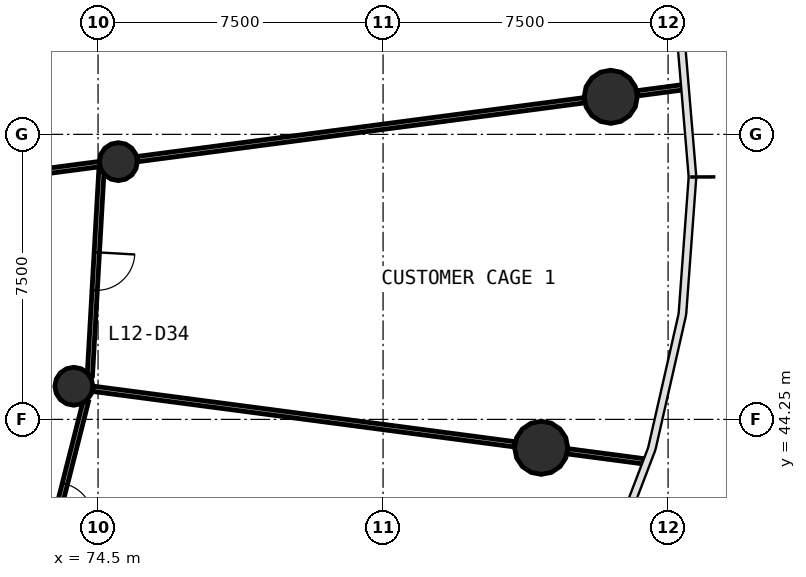
"""IFC4 building model, lengths in metres.
Left out: names, types, materials, properties, quantities, classifications, styles, units other than length and angle.
Written with IfcOpenShell. Run it as: python <this file> out.ifc"""

import sys

from ifc_helpers import new_model, si_unit, direction, frame, frame_2d, origin, origin_2d, place, context, subcontext, project, spatial, rectangle, circle, extrude, source, transform, mapped, element, fill, save


model = new_model("IFC4")
c1 = context("Model", 3, precision=1e-05, world=origin(), true_north=direction((0.0, 1.0)))
c2 = subcontext(c1, "Body", "Model", "MODEL_VIEW")
j1 = project(units=[si_unit("LENGTHUNIT", "METRE"), si_unit("PLANEANGLEUNIT", "RADIAN")], contexts=[c1])
p1 = place(None, origin())
s1 = spatial("IfcSite", under=j1, at=p1, CompositionType="ELEMENT")
p2 = place(p1, origin())
s2 = spatial("IfcBuilding", under=s1, at=p2, CompositionType="ELEMENT")
p3 = place(p2, frame((0.0, 0.0, 53.4)))
s3 = spatial("IfcBuildingStorey", under=s2, at=p3, CompositionType="ELEMENT", Elevation=53.4)
m1 = source(origin(), c2, "Body", "SweptSolid", [
    extrude(circle(Radius=0.7, at=origin_2d()), origin(), (0.0, 0.0, 1.0), 4.4),
])
for number, where, z_axis, x_axis in (
    (1, (87.99, 52.738, 0.0), (0.0, 0.0, 1.0), (1.0, 0.0, 0.0)),
    (2, (86.161, 43.503, 0.0), (0.0, 0.0, 1.0), (1.0, 0.0, 0.0)),
):
    element("IfcColumn", number, at=place(p3, frame(where, z_axis=z_axis, x_axis=x_axis)), inside=s3, PredefinedType="COLUMN", context=c2, shape_type="MappedRepresentation", body=[
        mapped(m1, transform((0.0, 0.0, 0.0), scale=1.0)),
    ])
m2 = source(origin(), c2, "Body", "SweptSolid", [
    extrude(circle(Radius=0.5, at=origin_2d()), origin(), (0.0, 0.0, 1.0), 4.4),
])
for number, where, z_axis, x_axis in (
    (3, (75.034, 51.032, 0.0), (0.0, 0.0, 1.0), (1.0, 0.0, 0.0)),
    (4, (73.863, 45.122, 0.0), (0.0, 0.0, 1.0), (1.0, 0.0, 0.0)),
):
    element("IfcColumn", number, at=place(p3, frame(where, z_axis=z_axis, x_axis=x_axis)), inside=s3, PredefinedType="COLUMN", context=c2, shape_type="MappedRepresentation", body=[
        mapped(m2, transform((0.0, 0.0, 0.0), scale=1.0)),
    ])
p4 = place(p3, frame((75.534, 51.098, 0.0), z_axis=(0.0, 0.0, 1.0), x_axis=(0.991446586451, 0.130513088287, 0.0)))
e5 = element("IfcWall", 5, at=p4, inside=s3, PredefinedType="PARTITIONING", context=c2, shape_type="SweptSolid", body=[
    extrude(rectangle(XDim=11.86, YDim=0.14, at=frame_2d((5.93, 0.0))), origin(), (0.0, 0.0, 1.0), 3.05),
])
p5 = place(p3, frame((74.363, 45.056, 0.0), z_axis=(0.0, 0.0, 1.0), x_axis=(0.991443306772, -0.130538000051, 0.0)))
e6 = element("IfcWall", 6, at=p5, inside=s3, PredefinedType="PARTITIONING", context=c2, shape_type="SweptSolid", body=[
    extrude(rectangle(XDim=11.195, YDim=0.14, at=frame_2d((5.598, 0.0))), origin(), (0.0, 0.0, 1.0), 3.05),
])
p6 = place(p3, frame((67.49, 50.039, 0.0), z_axis=(0.0, 0.0, 1.0), x_axis=(0.99144622305, 0.130515848849, 0.0)))
e7 = element("IfcWall", 7, at=p6, inside=s3, PredefinedType="PARTITIONING", context=c2, shape_type="SweptSolid", body=[
    extrude(rectangle(XDim=7.104, YDim=0.14, at=frame_2d((3.552, 0.0))), origin(), (0.0, 0.0, 1.0), 3.05),
])
p7 = place(p3, frame((74.178, 44.727, 0.0), z_axis=(0.0, 0.0, 1.0), x_axis=(-0.245735490717, -0.969336922129, 0.0)))
e8 = element("IfcWall", 8, at=p7, inside=s3, PredefinedType="PARTITIONING", context=c2, shape_type="SweptSolid", body=[
    extrude(rectangle(XDim=5.491, YDim=0.14, at=frame_2d((2.746, 0.0))), origin(), (0.0, 0.0, 1.0), 3.05),
])
p8 = place(p7, frame((2.241, 0.0, 0.0)))
e9 = element("IfcOpeningElement", 9, at=p8, cuts=e8, PredefinedType="OPENING", context=c2, shape_type="SweptSolid", body=[
    extrude(rectangle(XDim=1.0, YDim=2.1, at=frame_2d((0.5, 1.05))), frame((0.0, 0.08, 0.0), z_axis=(0.0, -1.0, 0.0), x_axis=(1.0, 0.0, 0.0)), (0.0, 0.0, 1.0), 0.16),
])
p9 = place(p3, frame((74.589, 50.793, 0.0), z_axis=(0.0, 0.0, 1.0), x_axis=(-0.056551571082, -0.998399679391, 0.0)))
e10 = element("IfcWall", 10, at=p9, inside=s3, PredefinedType="PARTITIONING", context=c2, shape_type="SweptSolid", body=[
    extrude(rectangle(XDim=5.401, YDim=0.14, at=frame_2d((2.7, 0.0))), origin(), (0.0, 0.0, 1.0), 3.05),
])
p10 = place(p9, frame((2.151, 0.0, 0.0)))
e11 = element("IfcOpeningElement", 11, at=p10, cuts=e10, PredefinedType="OPENING", context=c2, shape_type="SweptSolid", body=[
    extrude(rectangle(XDim=1.0, YDim=2.1, at=frame_2d((0.5, 1.05))), frame((0.0, 0.08, 0.0), z_axis=(0.0, -1.0, 0.0), x_axis=(1.0, 0.0, 0.0)), (0.0, 0.0, 1.0), 0.16),
])
p11 = place(p3, frame((86.859, 43.411, 0.0), z_axis=(0.0, 0.0, 1.0), x_axis=(0.991443960057, -0.130533038219, 0.0)))
e12 = element("IfcWall", 12, at=p11, inside=s3, PredefinedType="PARTITIONING", context=c2, shape_type="SweptSolid", body=[
    extrude(rectangle(XDim=2.01, YDim=0.14, at=frame_2d((1.005, 0.0))), origin(), (0.0, 0.0, 1.0), 3.05),
])
p12 = place(p3, frame((88.689, 52.83, 0.0), z_axis=(0.0, 0.0, 1.0), x_axis=(0.991424298155, 0.130682290411, 0.0)))
e13 = element("IfcWall", 13, at=p12, inside=s3, PredefinedType="PARTITIONING", context=c2, shape_type="SweptSolid", body=[
    extrude(rectangle(XDim=1.22, YDim=0.14, at=frame_2d((0.61, 0.0))), origin(), (0.0, 0.0, 1.0), 3.05),
])
m3 = source(origin(), c2, "Body", "SweptSolid", [
    extrude(rectangle(XDim=1.0, YDim=2.1, at=frame_2d((0.5, 1.05))), frame((0.0, 0.025, 0.0), z_axis=(0.0, -1.0, 0.0), x_axis=(1.0, 0.0, 0.0)), (0.0, 0.0, 1.0), 0.05),
])
p13 = place(p8, origin())
e14 = element("IfcDoor", 14, at=p13, inside=s3, OperationType="SINGLE_SWING_RIGHT", PredefinedType="DOOR", context=c2, shape_type="MappedRepresentation", body=[
    mapped(m3, transform((0.0, 0.0, 0.0), scale=1.0)),
])
fill(e9, e14)
p14 = place(p10, origin())
e15 = element("IfcDoor", 15, at=p14, inside=s3, OperationType="SINGLE_SWING_LEFT", PredefinedType="DOOR", context=c2, shape_type="MappedRepresentation", body=[
    mapped(m3, transform((0.0, 0.0, 0.0), scale=1.0)),
])
fill(e11, e15)
save(model, sys.argv[1])
